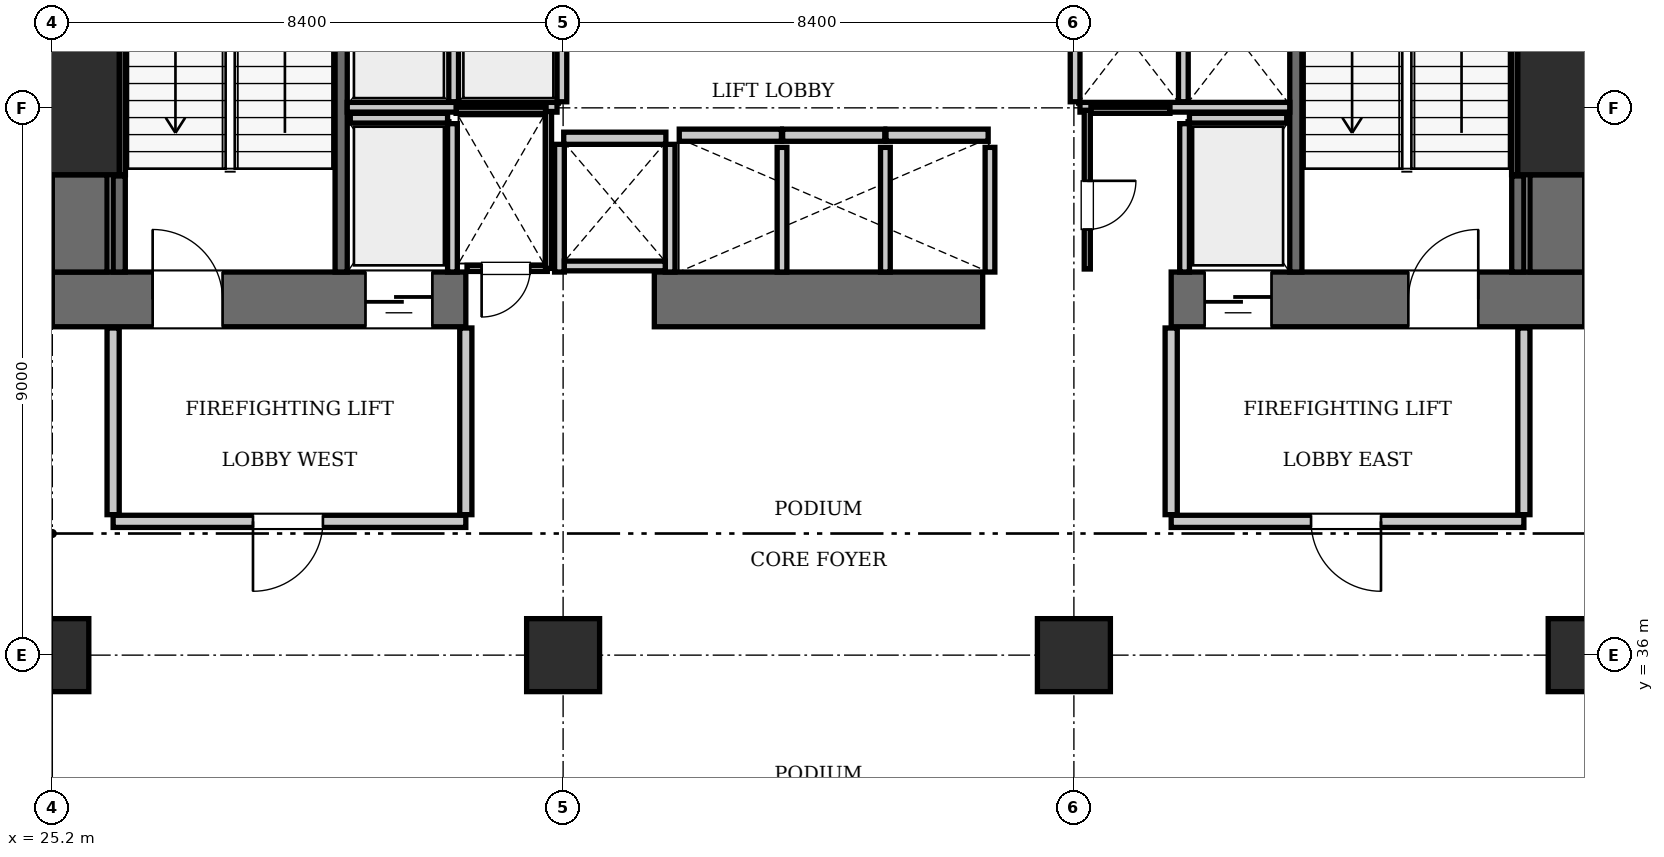
"""IFC4 building model, lengths in metres.
Left out: names, types, materials, properties, quantities, classifications, styles, units other than length and angle.
Written with IfcOpenShell. Run it as: python <this file> out.ifc"""

import sys

from ifc_helpers import new_model, si_unit, direction, frame, frame_2d, origin, origin_2d, place, context, subcontext, project, spatial, rectangle, extrude, element, fill, save


model = new_model("IFC4")
c1 = context("Model", 3, precision=1e-05, world=origin(), true_north=direction((0.0, 1.0)))
c2 = subcontext(c1, "Body", "Model", "MODEL_VIEW")
j1 = project(units=[si_unit("LENGTHUNIT", "METRE"), si_unit("PLANEANGLEUNIT", "RADIAN")], contexts=[c1])
p1 = place(None, origin())
s1 = spatial("IfcSite", under=j1, at=p1, CompositionType="ELEMENT")
p2 = place(p1, origin())
s2 = spatial("IfcBuilding", under=s1, at=p2, CompositionType="ELEMENT")
p3 = place(p2, frame((0.0, 0.0, 5.6)))
s3 = spatial("IfcBuildingStorey", under=s2, at=p3, CompositionType="ELEMENT", Elevation=5.6)
for number, where, z_axis, x_axis in (
    (1, (25.2, 45.0, 0.0), (0.0, 0.0, 1.0), (1.0, 0.0, 0.0)),
    (2, (50.4, 45.0, 0.0), (0.0, 0.0, 1.0), (1.0, 0.0, 0.0)),
):
    element("IfcColumn", number, at=place(p3, frame(where, z_axis=z_axis, x_axis=x_axis)), inside=s3, PredefinedType="COLUMN", context=c2, shape_type="SweptSolid", body=[
        extrude(rectangle(XDim=2.2, YDim=2.2, at=origin_2d()), origin(), (0.0, 0.0, 1.0), 5.25),
    ])
p4 = place(p3, frame((25.2, 41.85, 0.0), z_axis=(0.0, 0.0, 1.0), x_axis=(1.0, 0.0, 0.0)))
e3 = element("IfcWall", 3, at=p4, inside=s3, PredefinedType="SHEAR", context=c2, shape_type="SweptSolid", body=[
    extrude(rectangle(XDim=6.8, YDim=0.9, at=frame_2d((3.4, 0.0))), origin(), (0.0, 0.0, 1.0), 5.25),
])
p5 = place(p4, frame((1.65, 0.0, 0.0)))
e4 = element("IfcOpeningElement", 4, at=p5, cuts=e3, PredefinedType="OPENING", context=c2, shape_type="SweptSolid", body=[
    extrude(rectangle(XDim=1.15, YDim=2.15, at=frame_2d((0.575, 1.075))), frame((0.0, 0.46, 0.0), z_axis=(0.0, -1.0, 0.0), x_axis=(1.0, 0.0, 0.0)), (0.0, 0.0, 1.0), 0.92),
])
p6 = place(p4, frame((5.15, 0.0, 0.0)))
e5 = element("IfcOpeningElement", 5, at=p6, cuts=e3, PredefinedType="OPENING", context=c2, shape_type="SweptSolid", body=[
    extrude(rectangle(XDim=1.1, YDim=2.2, at=frame_2d((0.55, 1.1))), frame((0.0, 0.46, 0.0), z_axis=(0.0, -1.0, 0.0), x_axis=(1.0, 0.0, 0.0)), (0.0, 0.0, 1.0), 0.92),
])
p7 = place(p3, frame((35.1, 41.85, 0.0), z_axis=(0.0, 0.0, 1.0), x_axis=(1.0, 0.0, 0.0)))
e6 = element("IfcWall", 6, at=p7, inside=s3, PredefinedType="SHEAR", context=c2, shape_type="SweptSolid", body=[
    extrude(rectangle(XDim=5.4, YDim=0.9, at=frame_2d((2.7, 0.0))), origin(), (0.0, 0.0, 1.0), 5.25),
])
p8 = place(p3, frame((43.6, 41.85, 0.0), z_axis=(0.0, 0.0, 1.0), x_axis=(1.0, 0.0, 0.0)))
e7 = element("IfcWall", 7, at=p8, inside=s3, PredefinedType="SHEAR", context=c2, shape_type="SweptSolid", body=[
    extrude(rectangle(XDim=6.8, YDim=0.9, at=frame_2d((3.4, 0.0))), origin(), (0.0, 0.0, 1.0), 5.25),
])
p9 = place(p8, frame((3.9, 0.0, 0.0)))
e8 = element("IfcOpeningElement", 8, at=p9, cuts=e7, PredefinedType="OPENING", context=c2, shape_type="SweptSolid", body=[
    extrude(rectangle(XDim=1.15, YDim=2.15, at=frame_2d((0.575, 1.075))), frame((0.0, 0.46, 0.0), z_axis=(0.0, -1.0, 0.0), x_axis=(1.0, 0.0, 0.0)), (0.0, 0.0, 1.0), 0.92),
])
p10 = place(p8, frame((0.55, 0.0, 0.0)))
e9 = element("IfcOpeningElement", 9, at=p10, cuts=e7, PredefinedType="OPENING", context=c2, shape_type="SweptSolid", body=[
    extrude(rectangle(XDim=1.1, YDim=2.2, at=frame_2d((0.55, 1.1))), frame((0.0, 0.46, 0.0), z_axis=(0.0, -1.0, 0.0), x_axis=(1.0, 0.0, 0.0)), (0.0, 0.0, 1.0), 0.92),
])
for number, where, z_axis, x_axis in (
    (10, (25.65, 42.3, 0.0), (0.0, 0.0, 1.0), (0.0, 1.0, 0.0)),
    (11, (49.95, 42.3, 0.0), (0.0, 0.0, 1.0), (0.0, 1.0, 0.0)),
):
    element("IfcWall", number, at=place(p3, frame(where, z_axis=z_axis, x_axis=x_axis)), inside=s3, PredefinedType="SHEAR", context=c2, shape_type="SweptSolid", body=[
        extrude(rectangle(XDim=1.6, YDim=0.9, at=frame_2d((0.8, 0.0))), origin(), (0.0, 0.0, 1.0), 5.25),
    ])
for number, where, z_axis, x_axis in (
    (12, (25.2, 36.0, 0.0), (0.0, 0.0, 1.0), (1.0, 0.0, 0.0)),
    (13, (33.6, 36.0, 0.0), (0.0, 0.0, 1.0), (1.0, 0.0, 0.0)),
    (14, (42.0, 36.0, 0.0), (0.0, 0.0, 1.0), (1.0, 0.0, 0.0)),
    (15, (50.4, 36.0, 0.0), (0.0, 0.0, 1.0), (1.0, 0.0, 0.0)),
):
    element("IfcColumn", number, at=place(p3, frame(where, z_axis=z_axis, x_axis=x_axis)), inside=s3, PredefinedType="COLUMN", context=c2, shape_type="SweptSolid", body=[
        extrude(rectangle(XDim=1.2, YDim=1.2, at=origin_2d()), origin(), (0.0, 0.0, 1.0), 5.25),
    ])
p11 = place(p3, frame((29.95, 42.3, 0.0), z_axis=(0.0, 0.0, 1.0), x_axis=(0.0, 1.0, 0.0)))
e16 = element("IfcWall", 16, at=p11, inside=s3, PredefinedType="SOLIDWALL", context=c2, shape_type="SweptSolid", body=[
    extrude(rectangle(XDim=8.85, YDim=0.2, at=frame_2d((4.425, 0.0))), origin(), (0.0, 0.0, 1.0), 4.97),
])
p12 = place(p3, frame((26.3, 42.3, 0.0), z_axis=(0.0, 0.0, 1.0), x_axis=(0.0, 1.0, 0.0)))
e17 = element("IfcWall", 17, at=p12, inside=s3, PredefinedType="SOLIDWALL", context=c2, shape_type="SweptSolid", body=[
    extrude(rectangle(XDim=1.58, YDim=0.2, at=frame_2d((0.79, 0.0))), origin(), (0.0, 0.0, 1.0), 4.97),
])
p13 = place(p3, frame((26.352, 43.9, 0.0), z_axis=(0.0, 0.0, 1.0), x_axis=(0.0, 1.0, 0.0)))
e18 = element("IfcWall", 18, at=p13, inside=s3, PredefinedType="SOLIDWALL", context=c2, shape_type="SweptSolid", body=[
    extrude(rectangle(XDim=2.2, YDim=0.1, at=frame_2d((1.1, 0.0))), origin(), (0.0, 0.0, 1.0), 4.97),
])
p14 = place(p3, frame((45.65, 42.3, 0.0), z_axis=(0.0, 0.0, 1.0), x_axis=(0.0, 1.0, 0.0)))
e19 = element("IfcWall", 19, at=p14, inside=s3, PredefinedType="SOLIDWALL", context=c2, shape_type="SweptSolid", body=[
    extrude(rectangle(XDim=8.85, YDim=0.2, at=frame_2d((4.425, 0.0))), origin(), (0.0, 0.0, 1.0), 4.97),
])
p15 = place(p3, frame((49.3, 42.3, 0.0), z_axis=(0.0, 0.0, 1.0), x_axis=(0.0, 1.0, 0.0)))
e20 = element("IfcWall", 20, at=p15, inside=s3, PredefinedType="SOLIDWALL", context=c2, shape_type="SweptSolid", body=[
    extrude(rectangle(XDim=1.58, YDim=0.2, at=frame_2d((0.79, 0.0))), origin(), (0.0, 0.0, 1.0), 4.97),
])
p16 = place(p3, frame((49.248, 43.9, 0.0), z_axis=(0.0, 0.0, 1.0), x_axis=(0.0, 1.0, 0.0)))
e21 = element("IfcWall", 21, at=p16, inside=s3, PredefinedType="SOLIDWALL", context=c2, shape_type="SweptSolid", body=[
    extrude(rectangle(XDim=2.2, YDim=0.1, at=frame_2d((1.1, 0.0))), origin(), (0.0, 0.0, 1.0), 4.97),
])
for number, where, z_axis, x_axis in (
    (22, (35.51, 44.55, 0.0), (0.0, 0.0, 1.0), (1.0, 0.0, 0.0)),
    (23, (37.21, 44.55, 0.0), (0.0, 0.0, 1.0), (1.0, 0.0, 0.0)),
):
    element("IfcWall", number, at=place(p3, frame(where, z_axis=z_axis, x_axis=x_axis)), inside=s3, PredefinedType="SOLIDWALL", context=c2, shape_type="SweptSolid", body=[
        extrude(rectangle(XDim=1.68, YDim=0.2, at=frame_2d((0.84, 0.0))), origin(), (0.0, 0.0, 1.0), 4.97),
    ])
p17 = place(p3, frame((38.91, 44.55, 0.0), z_axis=(0.0, 0.0, 1.0), x_axis=(1.0, 0.0, 0.0)))
e24 = element("IfcWall", 24, at=p17, inside=s3, PredefinedType="SOLIDWALL", context=c2, shape_type="SweptSolid", body=[
    extrude(rectangle(XDim=1.68, YDim=0.2, at=frame_2d((0.84, 0.0))), origin(), (0.0, 0.0, 1.0), 4.97),
])
p18 = place(p3, frame((33.61, 44.5, 0.0), z_axis=(0.0, 0.0, 1.0), x_axis=(1.0, 0.0, 0.0)))
e25 = element("IfcWall", 25, at=p18, inside=s3, PredefinedType="SOLIDWALL", context=c2, shape_type="SweptSolid", body=[
    extrude(rectangle(XDim=1.68, YDim=0.2, at=frame_2d((0.84, 0.0))), origin(), (0.0, 0.0, 1.0), 4.97),
])
p19 = place(p3, frame((30.1, 44.83, 0.0), z_axis=(0.0, 0.0, 1.0), x_axis=(1.0, 0.0, 0.0)))
e26 = element("IfcWall", 26, at=p19, inside=s3, PredefinedType="SOLIDWALL", context=c2, shape_type="SweptSolid", body=[
    extrude(rectangle(XDim=1.6, YDim=0.16, at=frame_2d((0.8, 0.0))), origin(), (0.0, 0.0, 1.0), 4.97),
])
p20 = place(p3, frame((31.78, 42.3, 0.0), z_axis=(0.0, 0.0, 1.0), x_axis=(0.0, 1.0, 0.0)))
e27 = element("IfcWall", 27, at=p20, inside=s3, PredefinedType="SOLIDWALL", context=c2, shape_type="SweptSolid", body=[
    extrude(rectangle(XDim=2.44, YDim=0.16, at=frame_2d((1.22, 0.0))), origin(), (0.0, 0.0, 1.0), 4.97),
])
p21 = place(p3, frame((43.9, 44.83, 0.0), z_axis=(0.0, 0.0, 1.0), x_axis=(1.0, 0.0, 0.0)))
e28 = element("IfcWall", 28, at=p21, inside=s3, PredefinedType="SOLIDWALL", context=c2, shape_type="SweptSolid", body=[
    extrude(rectangle(XDim=1.6, YDim=0.16, at=frame_2d((0.8, 0.0))), origin(), (0.0, 0.0, 1.0), 4.97),
])
p22 = place(p3, frame((43.82, 42.3, 0.0), z_axis=(0.0, 0.0, 1.0), x_axis=(0.0, 1.0, 0.0)))
e29 = element("IfcWall", 29, at=p22, inside=s3, PredefinedType="SOLIDWALL", context=c2, shape_type="SweptSolid", body=[
    extrude(rectangle(XDim=2.44, YDim=0.16, at=frame_2d((1.22, 0.0))), origin(), (0.0, 0.0, 1.0), 4.97),
])
for number, where, z_axis, x_axis in (
    (30, (31.8, 45.1, 0.0), (0.0, 0.0, 1.0), (0.0, 1.0, 0.0)),
    (31, (33.58, 45.1, 0.0), (0.0, 0.0, 1.0), (0.0, 1.0, 0.0)),
):
    element("IfcWall", number, at=place(p3, frame(where, z_axis=z_axis, x_axis=x_axis)), inside=s3, PredefinedType="SOLIDWALL", context=c2, shape_type="SweptSolid", body=[
        extrude(rectangle(XDim=1.95, YDim=0.16, at=frame_2d((0.975, 0.0))), origin(), (0.0, 0.0, 1.0), 4.97),
    ])
p23 = place(p3, frame((30.05, 45.01, 0.0), z_axis=(0.0, 0.0, 1.0), x_axis=(1.0, 0.0, 0.0)))
e32 = element("IfcWall", 32, at=p23, inside=s3, PredefinedType="SOLIDWALL", context=c2, shape_type="SweptSolid", body=[
    extrude(rectangle(XDim=3.45, YDim=0.16, at=frame_2d((1.725, 0.0))), origin(), (0.0, 0.0, 1.0), 4.97),
])
for number, where, z_axis, x_axis in (
    (33, (42.02, 45.1, 0.0), (0.0, 0.0, 1.0), (0.0, 1.0, 0.0)),
    (34, (43.8, 45.1, 0.0), (0.0, 0.0, 1.0), (0.0, 1.0, 0.0)),
):
    element("IfcWall", number, at=place(p3, frame(where, z_axis=z_axis, x_axis=x_axis)), inside=s3, PredefinedType="SOLIDWALL", context=c2, shape_type="SweptSolid", body=[
        extrude(rectangle(XDim=1.95, YDim=0.16, at=frame_2d((0.975, 0.0))), origin(), (0.0, 0.0, 1.0), 4.97),
    ])
p24 = place(p3, frame((42.1, 45.01, 0.0), z_axis=(0.0, 0.0, 1.0), x_axis=(1.0, 0.0, 0.0)))
e35 = element("IfcWall", 35, at=p24, inside=s3, PredefinedType="SOLIDWALL", context=c2, shape_type="SweptSolid", body=[
    extrude(rectangle(XDim=3.45, YDim=0.16, at=frame_2d((1.725, 0.0))), origin(), (0.0, 0.0, 1.0), 4.97),
])
for number, where, z_axis, x_axis in (
    (36, (37.2, 42.3, 0.0), (0.0, 0.0, 1.0), (0.0, 1.0, 0.0)),
    (37, (38.9, 42.3, 0.0), (0.0, 0.0, 1.0), (0.0, 1.0, 0.0)),
    (38, (40.62, 42.3, 0.0), (0.0, 0.0, 1.0), (0.0, 1.0, 0.0)),
):
    element("IfcWall", number, at=place(p3, frame(where, z_axis=z_axis, x_axis=x_axis)), inside=s3, PredefinedType="SOLIDWALL", context=c2, shape_type="SweptSolid", body=[
        extrude(rectangle(XDim=2.05, YDim=0.16, at=frame_2d((1.025, 0.0))), origin(), (0.0, 0.0, 1.0), 4.97),
    ])
for number, where, z_axis, x_axis in (
    (39, (33.54, 42.3, 0.0), (0.0, 0.0, 1.0), (0.0, 1.0, 0.0)),
    (40, (35.36, 42.3, 0.0), (0.0, 0.0, 1.0), (0.0, 1.0, 0.0)),
):
    element("IfcWall", number, at=place(p3, frame(where, z_axis=z_axis, x_axis=x_axis)), inside=s3, PredefinedType="SOLIDWALL", context=c2, shape_type="SweptSolid", body=[
        extrude(rectangle(XDim=2.1, YDim=0.16, at=frame_2d((1.05, 0.0))), origin(), (0.0, 0.0, 1.0), 4.97),
    ])
p25 = place(p3, frame((33.62, 42.4, 0.0), z_axis=(0.0, 0.0, 1.0), x_axis=(1.0, 0.0, 0.0)))
e41 = element("IfcWall", 41, at=p25, inside=s3, PredefinedType="SOLIDWALL", context=c2, shape_type="SweptSolid", body=[
    extrude(rectangle(XDim=1.66, YDim=0.16, at=frame_2d((0.83, 0.0))), origin(), (0.0, 0.0, 1.0), 4.97),
])
p26 = place(p3, frame((26.2, 38.2, 0.0), z_axis=(0.0, 0.0, 1.0), x_axis=(1.0, 0.0, 0.0)))
e42 = element("IfcWall", 42, at=p26, inside=s3, PredefinedType="PARTITIONING", context=c2, shape_type="SweptSolid", body=[
    extrude(rectangle(XDim=5.8, YDim=0.2, at=frame_2d((2.9, 0.0))), origin(), (0.0, 0.0, 1.0), 4.97),
])
p27 = place(p26, frame((2.3, 0.0, 0.0)))
e43 = element("IfcOpeningElement", 43, at=p27, cuts=e42, PredefinedType="OPENING", context=c2, shape_type="SweptSolid", body=[
    extrude(rectangle(XDim=1.15, YDim=2.15, at=frame_2d((0.575, 1.075))), frame((0.0, 0.11, 0.0), z_axis=(0.0, -1.0, 0.0), x_axis=(1.0, 0.0, 0.0)), (0.0, 0.0, 1.0), 0.22),
])
for number, where, z_axis, x_axis in (
    (44, (26.2, 38.31, 0.0), (0.0, 0.0, 1.0), (0.0, 1.0, 0.0)),
    (45, (32.0, 38.31, 0.0), (0.0, 0.0, 1.0), (0.0, 1.0, 0.0)),
):
    element("IfcWall", number, at=place(p3, frame(where, z_axis=z_axis, x_axis=x_axis)), inside=s3, PredefinedType="PARTITIONING", context=c2, shape_type="SweptSolid", body=[
        extrude(rectangle(XDim=3.07, YDim=0.2, at=frame_2d((1.535, 0.0))), origin(), (0.0, 0.0, 1.0), 4.97),
    ])
p28 = place(p3, frame((43.6, 38.2, 0.0), z_axis=(0.0, 0.0, 1.0), x_axis=(1.0, 0.0, 0.0)))
e46 = element("IfcWall", 46, at=p28, inside=s3, PredefinedType="PARTITIONING", context=c2, shape_type="SweptSolid", body=[
    extrude(rectangle(XDim=5.8, YDim=0.2, at=frame_2d((2.9, 0.0))), origin(), (0.0, 0.0, 1.0), 4.97),
])
p29 = place(p28, frame((2.3, 0.0, 0.0)))
e47 = element("IfcOpeningElement", 47, at=p29, cuts=e46, PredefinedType="OPENING", context=c2, shape_type="SweptSolid", body=[
    extrude(rectangle(XDim=1.15, YDim=2.15, at=frame_2d((0.575, 1.075))), frame((0.0, 0.11, 0.0), z_axis=(0.0, -1.0, 0.0), x_axis=(1.0, 0.0, 0.0)), (0.0, 0.0, 1.0), 0.22),
])
for number, where, z_axis, x_axis in (
    (48, (43.6, 38.31, 0.0), (0.0, 0.0, 1.0), (0.0, 1.0, 0.0)),
    (49, (49.4, 38.31, 0.0), (0.0, 0.0, 1.0), (0.0, 1.0, 0.0)),
):
    element("IfcWall", number, at=place(p3, frame(where, z_axis=z_axis, x_axis=x_axis)), inside=s3, PredefinedType="PARTITIONING", context=c2, shape_type="SweptSolid", body=[
        extrude(rectangle(XDim=3.07, YDim=0.2, at=frame_2d((1.535, 0.0))), origin(), (0.0, 0.0, 1.0), 4.97),
    ])
p30 = place(p3, frame((32.02, 42.36, 0.0), z_axis=(0.0, 0.0, 1.0), x_axis=(1.0, 0.0, 0.0)))
e50 = element("IfcWall", 50, at=p30, inside=s3, PredefinedType="PARTITIONING", context=c2, shape_type="SweptSolid", body=[
    extrude(rectangle(XDim=1.32, YDim=0.1, at=frame_2d((0.66, 0.0))), origin(), (0.0, 0.0, 1.0), 4.97),
])
p31 = place(p30, frame((0.24, 0.0, 0.0)))
e51 = element("IfcOpeningElement", 51, at=p31, cuts=e50, PredefinedType="OPENING", context=c2, shape_type="SweptSolid", body=[
    extrude(rectangle(XDim=0.8, YDim=2.05, at=frame_2d((0.4, 1.025))), frame((0.0, 0.06, 0.0), z_axis=(0.0, -1.0, 0.0), x_axis=(1.0, 0.0, 0.0)), (0.0, 0.0, 1.0), 0.12),
])
p32 = place(p3, frame((31.84, 44.96, 0.0), z_axis=(0.0, 0.0, 1.0), x_axis=(1.0, 0.0, 0.0)))
e52 = element("IfcWall", 52, at=p32, inside=s3, PredefinedType="PARTITIONING", context=c2, shape_type="SweptSolid", body=[
    extrude(rectangle(XDim=1.48, YDim=0.1, at=frame_2d((0.74, 0.0))), origin(), (0.0, 0.0, 1.0), 4.97),
])
p33 = place(p3, frame((33.36, 42.36, 0.0), z_axis=(0.0, 0.0, 1.0), x_axis=(0.0, 1.0, 0.0)))
e53 = element("IfcWall", 53, at=p33, inside=s3, PredefinedType="PARTITIONING", context=c2, shape_type="SweptSolid", body=[
    extrude(rectangle(XDim=2.58, YDim=0.1, at=frame_2d((1.29, 0.0))), origin(), (0.0, 0.0, 1.0), 4.97),
])
p34 = place(p3, frame((42.22, 42.35, 0.0), z_axis=(0.0, 0.0, 1.0), x_axis=(0.0, 1.0, 0.0)))
e54 = element("IfcWall", 54, at=p34, inside=s3, PredefinedType="PARTITIONING", context=c2, shape_type="SweptSolid", body=[
    extrude(rectangle(XDim=2.61, YDim=0.1, at=frame_2d((1.305, 0.0))), origin(), (0.0, 0.0, 1.0), 4.97),
])
p35 = place(p34, frame((0.65, 0.0, 0.0)))
e55 = element("IfcOpeningElement", 55, at=p35, cuts=e54, PredefinedType="OPENING", context=c2, shape_type="SweptSolid", body=[
    extrude(rectangle(XDim=0.8, YDim=2.05, at=frame_2d((0.4, 1.025))), frame((0.0, 0.06, 0.0), z_axis=(0.0, -1.0, 0.0), x_axis=(1.0, 0.0, 0.0)), (0.0, 0.0, 1.0), 0.12),
])
p36 = place(p3, frame((42.28, 44.96, 0.0), z_axis=(0.0, 0.0, 1.0), x_axis=(1.0, 0.0, 0.0)))
e56 = element("IfcWall", 56, at=p36, inside=s3, PredefinedType="PARTITIONING", context=c2, shape_type="SweptSolid", body=[
    extrude(rectangle(XDim=1.3, YDim=0.1, at=frame_2d((0.65, 0.0))), origin(), (0.0, 0.0, 1.0), 4.97),
])
p37 = place(p5, origin())
e57 = element("IfcDoor", 57, at=p37, inside=s3, OperationType="SINGLE_SWING_LEFT", PredefinedType="DOOR", context=c2, shape_type="SweptSolid", body=[
    extrude(rectangle(XDim=1.15, YDim=2.15, at=frame_2d((0.575, 1.075))), frame((0.0, 0.025, 0.0), z_axis=(0.0, -1.0, 0.0), x_axis=(1.0, 0.0, 0.0)), (0.0, 0.0, 1.0), 0.05),
])
fill(e4, e57)
p38 = place(p9, origin())
e58 = element("IfcDoor", 58, at=p38, inside=s3, OperationType="SINGLE_SWING_RIGHT", PredefinedType="DOOR", context=c2, shape_type="SweptSolid", body=[
    extrude(rectangle(XDim=1.15, YDim=2.15, at=frame_2d((0.575, 1.075))), frame((0.0, 0.025, 0.0), z_axis=(0.0, -1.0, 0.0), x_axis=(1.0, 0.0, 0.0)), (0.0, 0.0, 1.0), 0.05),
])
fill(e8, e58)
p39 = place(p6, frame((1.1, 0.0, 0.0), z_axis=(0.0, 0.0, 1.0), x_axis=(-1.0, 0.0, 0.0)))
e59 = element("IfcDoor", 59, at=p39, inside=s3, OperationType="SLIDING_TO_LEFT", PredefinedType="DOOR", context=c2, shape_type="SweptSolid", body=[
    extrude(rectangle(XDim=1.1, YDim=2.2, at=frame_2d((0.55, 1.1))), frame((0.0, 0.025, 0.0), z_axis=(0.0, -1.0, 0.0), x_axis=(1.0, 0.0, 0.0)), (0.0, 0.0, 1.0), 0.05),
])
fill(e5, e59)
p40 = place(p10, frame((1.1, 0.0, 0.0), z_axis=(0.0, 0.0, 1.0), x_axis=(-1.0, 0.0, 0.0)))
e60 = element("IfcDoor", 60, at=p40, inside=s3, OperationType="SLIDING_TO_LEFT", PredefinedType="DOOR", context=c2, shape_type="SweptSolid", body=[
    extrude(rectangle(XDim=1.1, YDim=2.2, at=frame_2d((0.55, 1.1))), frame((0.0, 0.025, 0.0), z_axis=(0.0, -1.0, 0.0), x_axis=(1.0, 0.0, 0.0)), (0.0, 0.0, 1.0), 0.05),
])
fill(e9, e60)
p41 = place(p27, frame((1.15, 0.0, 0.0), z_axis=(0.0, 0.0, 1.0), x_axis=(-1.0, 0.0, 0.0)))
e61 = element("IfcDoor", 61, at=p41, inside=s3, OperationType="SINGLE_SWING_RIGHT", PredefinedType="DOOR", context=c2, shape_type="SweptSolid", body=[
    extrude(rectangle(XDim=1.15, YDim=2.15, at=frame_2d((0.575, 1.075))), frame((0.0, 0.025, 0.0), z_axis=(0.0, -1.0, 0.0), x_axis=(1.0, 0.0, 0.0)), (0.0, 0.0, 1.0), 0.05),
])
fill(e43, e61)
p42 = place(p29, frame((1.15, 0.0, 0.0), z_axis=(0.0, 0.0, 1.0), x_axis=(-1.0, 0.0, 0.0)))
e62 = element("IfcDoor", 62, at=p42, inside=s3, OperationType="SINGLE_SWING_LEFT", PredefinedType="DOOR", context=c2, shape_type="SweptSolid", body=[
    extrude(rectangle(XDim=1.15, YDim=2.15, at=frame_2d((0.575, 1.075))), frame((0.0, 0.025, 0.0), z_axis=(0.0, -1.0, 0.0), x_axis=(1.0, 0.0, 0.0)), (0.0, 0.0, 1.0), 0.05),
])
fill(e47, e62)
p43 = place(p31, frame((0.8, 0.0, 0.0), z_axis=(0.0, 0.0, 1.0), x_axis=(-1.0, 0.0, 0.0)))
e63 = element("IfcDoor", 63, at=p43, inside=s3, OperationType="SINGLE_SWING_RIGHT", PredefinedType="DOOR", context=c2, shape_type="SweptSolid", body=[
    extrude(rectangle(XDim=0.8, YDim=2.05, at=frame_2d((0.4, 1.025))), frame((0.0, 0.025, 0.0), z_axis=(0.0, -1.0, 0.0), x_axis=(1.0, 0.0, 0.0)), (0.0, 0.0, 1.0), 0.05),
])
fill(e51, e63)
p44 = place(p35, frame((0.8, 0.0, 0.0), z_axis=(0.0, 0.0, 1.0), x_axis=(-1.0, 0.0, 0.0)))
e64 = element("IfcDoor", 64, at=p44, inside=s3, OperationType="SINGLE_SWING_LEFT", PredefinedType="DOOR", context=c2, shape_type="SweptSolid", body=[
    extrude(rectangle(XDim=0.8, YDim=2.05, at=frame_2d((0.4, 1.025))), frame((0.0, 0.025, 0.0), z_axis=(0.0, -1.0, 0.0), x_axis=(1.0, 0.0, 0.0)), (0.0, 0.0, 1.0), 0.05),
])
fill(e55, e64)
save(model, sys.argv[1])
